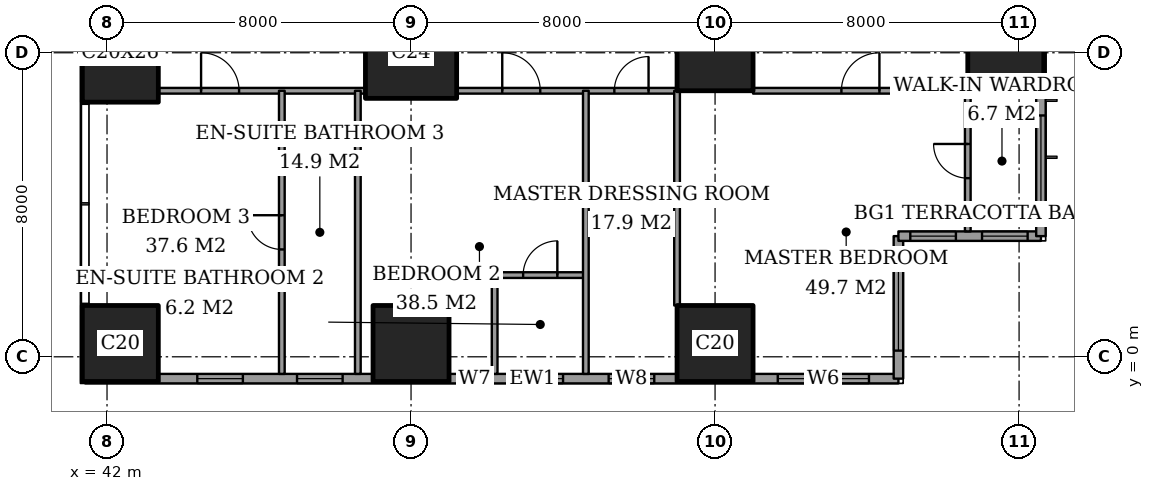
"""IFC4 building model, lengths in metres.
Left out: names, types, materials, properties, quantities, classifications, styles, units other than length and angle.
Written with IfcOpenShell. Run it as: python <this file> out.ifc"""

import sys

from ifc_helpers import new_model, si_unit, direction, frame, frame_2d, origin, origin_2d, place, context, subcontext, project, spatial, rectangle, extrude, element, fill, save


model = new_model("IFC4")
c1 = context("Model", 3, precision=1e-05, world=origin(), true_north=direction((0.0, 1.0)))
c2 = subcontext(c1, "Body", "Model", "MODEL_VIEW")
j1 = project(units=[si_unit("LENGTHUNIT", "METRE"), si_unit("PLANEANGLEUNIT", "RADIAN")], contexts=[c1])
p1 = place(None, origin())
s1 = spatial("IfcSite", under=j1, at=p1, CompositionType="ELEMENT")
p2 = place(p1, origin())
s2 = spatial("IfcBuilding", under=s1, at=p2, CompositionType="ELEMENT")
p3 = place(p2, frame((0.0, 0.0, 69.2)))
s3 = spatial("IfcBuildingStorey", under=s2, at=p3, CompositionType="ELEMENT", Elevation=69.2)
p4 = place(p3, frame((42.35, 0.35, 0.0), z_axis=(0.0, 0.0, 1.0), x_axis=(1.0, 0.0, 0.0)))
e1 = element("IfcColumn", 1, at=p4, inside=s3, PredefinedType="COLUMN", context=c2, shape_type="SweptSolid", body=[
    extrude(rectangle(XDim=2.0, YDim=2.0, at=origin_2d()), origin(), (0.0, 0.0, 1.0), 3.6),
])
p5 = place(p3, frame((42.35, 8.0, 0.0), z_axis=(0.0, 0.0, 1.0), x_axis=(1.0, 0.0, 0.0)))
e2 = element("IfcColumn", 2, at=p5, inside=s3, PredefinedType="COLUMN", context=c2, shape_type="SweptSolid", body=[
    extrude(rectangle(XDim=2.0, YDim=2.6, at=origin_2d()), origin(), (0.0, 0.0, 1.0), 3.6),
])
p6 = place(p3, frame((50.0, 0.35, 0.0), z_axis=(0.0, 0.0, 1.0), x_axis=(1.0, 0.0, 0.0)))
e3 = element("IfcColumn", 3, at=p6, inside=s3, PredefinedType="COLUMN", context=c2, shape_type="SweptSolid", body=[
    extrude(rectangle(XDim=2.0, YDim=2.0, at=origin_2d()), origin(), (0.0, 0.0, 1.0), 3.6),
])
p7 = place(p3, frame((50.0, 8.0, 0.0), z_axis=(0.0, 0.0, 1.0), x_axis=(1.0, 0.0, 0.0)))
e4 = element("IfcColumn", 4, at=p7, inside=s3, PredefinedType="COLUMN", context=c2, shape_type="SweptSolid", body=[
    extrude(rectangle(XDim=2.4, YDim=2.4, at=origin_2d()), origin(), (0.0, 0.0, 1.0), 3.6),
])
for number, where, z_axis, x_axis in (
    (5, (58.0, 0.35, 0.0), (0.0, 0.0, 1.0), (1.0, 0.0, 0.0)),
    (6, (58.0, 8.0, 0.0), (0.0, 0.0, 1.0), (1.0, 0.0, 0.0)),
    (7, (65.65, 8.0, 0.0), (0.0, 0.0, 1.0), (1.0, 0.0, 0.0)),
):
    element("IfcColumn", number, at=place(p3, frame(where, z_axis=z_axis, x_axis=x_axis)), inside=s3, PredefinedType="COLUMN", context=c2, shape_type="SweptSolid", body=[
        extrude(rectangle(XDim=2.0, YDim=2.0, at=origin_2d()), origin(), (0.0, 0.0, 1.0), 3.6),
    ])
p8 = place(p3, frame((41.425, -0.575, 0.0), z_axis=(0.0, 0.0, 1.0), x_axis=(1.0, 0.0, 0.0)))
e8 = element("IfcWall", 8, at=p8, inside=s3, PredefinedType="SOLIDWALL", context=c2, shape_type="SweptSolid", body=[
    extrude(rectangle(XDim=21.4, YDim=0.25, at=frame_2d((10.7, 0.0))), origin(), (0.0, 0.0, 1.0), 3.6),
])
p9 = place(p8, frame((2.95, 0.0, 0.6)))
e9 = element("IfcOpeningElement", 9, at=p9, cuts=e8, PredefinedType="OPENING", context=c2, shape_type="SweptSolid", body=[
    extrude(rectangle(XDim=1.2, YDim=2.0, at=frame_2d((0.6, 1.0))), frame((0.0, 0.135, 0.0), z_axis=(0.0, -1.0, 0.0), x_axis=(1.0, 0.0, 0.0)), (0.0, 0.0, 1.0), 0.27),
])
p10 = place(p8, frame((5.575, 0.0, 0.6)))
e10 = element("IfcOpeningElement", 10, at=p10, cuts=e8, PredefinedType="OPENING", context=c2, shape_type="SweptSolid", body=[
    extrude(rectangle(XDim=1.2, YDim=2.0, at=frame_2d((0.6, 1.0))), frame((0.0, 0.135, 0.0), z_axis=(0.0, -1.0, 0.0), x_axis=(1.0, 0.0, 0.0)), (0.0, 0.0, 1.0), 0.27),
])
p11 = place(p8, frame((9.95, 0.0, 0.6)))
e11 = element("IfcOpeningElement", 11, at=p11, cuts=e8, PredefinedType="OPENING", context=c2, shape_type="SweptSolid", body=[
    extrude(rectangle(XDim=0.6, YDim=2.0, at=frame_2d((0.3, 1.0))), frame((0.0, 0.135, 0.0), z_axis=(0.0, -1.0, 0.0), x_axis=(1.0, 0.0, 0.0)), (0.0, 0.0, 1.0), 0.27),
])
p12 = place(p8, frame((11.375, 0.0, 0.6)))
e12 = element("IfcOpeningElement", 12, at=p12, cuts=e8, PredefinedType="OPENING", context=c2, shape_type="SweptSolid", body=[
    extrude(rectangle(XDim=1.2, YDim=2.0, at=frame_2d((0.6, 1.0))), frame((0.0, 0.135, 0.0), z_axis=(0.0, -1.0, 0.0), x_axis=(1.0, 0.0, 0.0)), (0.0, 0.0, 1.0), 0.27),
])
p13 = place(p8, frame((13.775, 0.0, 0.6)))
e13 = element("IfcOpeningElement", 13, at=p13, cuts=e8, PredefinedType="OPENING", context=c2, shape_type="SweptSolid", body=[
    extrude(rectangle(XDim=1.2, YDim=2.0, at=frame_2d((0.6, 1.0))), frame((0.0, 0.135, 0.0), z_axis=(0.0, -1.0, 0.0), x_axis=(1.0, 0.0, 0.0)), (0.0, 0.0, 1.0), 0.27),
])
p14 = place(p8, frame((18.225, 0.0, 0.6)))
e14 = element("IfcOpeningElement", 14, at=p14, cuts=e8, PredefinedType="OPENING", context=c2, shape_type="SweptSolid", body=[
    extrude(rectangle(XDim=2.4, YDim=2.0, at=frame_2d((1.2, 1.0))), frame((0.0, 0.135, 0.0), z_axis=(0.0, -1.0, 0.0), x_axis=(1.0, 0.0, 0.0)), (0.0, 0.0, 1.0), 0.27),
])
p15 = place(p3, frame((62.825, -0.575, 0.0), z_axis=(0.0, 0.0, 1.0), x_axis=(0.0, 1.0, 0.0)))
e15 = element("IfcWall", 15, at=p15, inside=s3, PredefinedType="SOLIDWALL", context=c2, shape_type="SweptSolid", body=[
    extrude(rectangle(XDim=3.75, YDim=0.25, at=frame_2d((1.875, 0.0))), origin(), (0.0, 0.0, 1.0), 3.6),
])
p16 = place(p15, frame((0.738, 0.0, 0.6)))
e16 = element("IfcOpeningElement", 16, at=p16, cuts=e15, PredefinedType="OPENING", context=c2, shape_type="SweptSolid", body=[
    extrude(rectangle(XDim=2.4, YDim=2.0, at=frame_2d((1.2, 1.0))), frame((0.0, 0.135, 0.0), z_axis=(0.0, -1.0, 0.0), x_axis=(1.0, 0.0, 0.0)), (0.0, 0.0, 1.0), 0.27),
])
p17 = place(p3, frame((62.825, 3.175, 0.0), z_axis=(0.0, 0.0, 1.0), x_axis=(1.0, 0.0, 0.0)))
e17 = element("IfcWall", 17, at=p17, inside=s3, PredefinedType="SOLIDWALL", context=c2, shape_type="SweptSolid", body=[
    extrude(rectangle(XDim=3.75, YDim=0.25, at=frame_2d((1.875, 0.0))), origin(), (0.0, 0.0, 1.0), 3.6),
])
p18 = place(p17, frame((0.312, 0.0, 0.6)))
e18 = element("IfcOpeningElement", 18, at=p18, cuts=e17, PredefinedType="OPENING", context=c2, shape_type="SweptSolid", body=[
    extrude(rectangle(XDim=1.2, YDim=2.0, at=frame_2d((0.6, 1.0))), frame((0.0, 0.135, 0.0), z_axis=(0.0, -1.0, 0.0), x_axis=(1.0, 0.0, 0.0)), (0.0, 0.0, 1.0), 0.27),
])
p19 = place(p17, frame((2.2, 0.0, 0.6)))
e19 = element("IfcOpeningElement", 19, at=p19, cuts=e17, PredefinedType="OPENING", context=c2, shape_type="SweptSolid", body=[
    extrude(rectangle(XDim=1.2, YDim=2.0, at=frame_2d((0.6, 1.0))), frame((0.0, 0.135, 0.0), z_axis=(0.0, -1.0, 0.0), x_axis=(1.0, 0.0, 0.0)), (0.0, 0.0, 1.0), 0.27),
])
p20 = place(p3, frame((66.575, 3.175, 0.0), z_axis=(0.0, 0.0, 1.0), x_axis=(0.0, 1.0, 0.0)))
e20 = element("IfcWall", 20, at=p20, inside=s3, PredefinedType="SOLIDWALL", context=c2, shape_type="SweptSolid", body=[
    extrude(rectangle(XDim=41.65, YDim=0.25, at=frame_2d((20.825, 0.0))), origin(), (0.0, 0.0, 1.0), 3.6),
])
p21 = place(p20, frame((0.775, 0.0, 0.6)))
e21 = element("IfcOpeningElement", 21, at=p21, cuts=e20, PredefinedType="OPENING", context=c2, shape_type="SweptSolid", body=[
    extrude(rectangle(XDim=2.4, YDim=2.0, at=frame_2d((1.2, 1.0))), frame((0.0, 0.135, 0.0), z_axis=(0.0, -1.0, 0.0), x_axis=(1.0, 0.0, 0.0)), (0.0, 0.0, 1.0), 0.27),
])
p22 = place(p20, frame((6.1, 0.0, 0.6)))
e22 = element("IfcOpeningElement", 22, at=p22, cuts=e20, PredefinedType="OPENING", context=c2, shape_type="SweptSolid", body=[
    extrude(rectangle(XDim=1.2, YDim=2.0, at=frame_2d((0.6, 1.0))), frame((0.0, 0.135, 0.0), z_axis=(0.0, -1.0, 0.0), x_axis=(1.0, 0.0, 0.0)), (0.0, 0.0, 1.0), 0.27),
])
p23 = place(p20, frame((8.275, 0.0, 0.6)))
e23 = element("IfcOpeningElement", 23, at=p23, cuts=e20, PredefinedType="OPENING", context=c2, shape_type="SweptSolid", body=[
    extrude(rectangle(XDim=2.4, YDim=2.0, at=frame_2d((1.2, 1.0))), frame((0.0, 0.135, 0.0), z_axis=(0.0, -1.0, 0.0), x_axis=(1.0, 0.0, 0.0)), (0.0, 0.0, 1.0), 0.27),
])
p24 = place(p20, frame((15.775, 0.0, 0.6)))
e24 = element("IfcOpeningElement", 24, at=p24, cuts=e20, PredefinedType="OPENING", context=c2, shape_type="SweptSolid", body=[
    extrude(rectangle(XDim=2.4, YDim=2.0, at=frame_2d((1.2, 1.0))), frame((0.0, 0.135, 0.0), z_axis=(0.0, -1.0, 0.0), x_axis=(1.0, 0.0, 0.0)), (0.0, 0.0, 1.0), 0.27),
])
p25 = place(p20, frame((23.475, 0.0, 0.6)))
e25 = element("IfcOpeningElement", 25, at=p25, cuts=e20, PredefinedType="OPENING", context=c2, shape_type="SweptSolid", body=[
    extrude(rectangle(XDim=2.4, YDim=2.0, at=frame_2d((1.2, 1.0))), frame((0.0, 0.135, 0.0), z_axis=(0.0, -1.0, 0.0), x_axis=(1.0, 0.0, 0.0)), (0.0, 0.0, 1.0), 0.27),
])
p26 = place(p20, frame((30.975, 0.0, 0.6)))
e26 = element("IfcOpeningElement", 26, at=p26, cuts=e20, PredefinedType="OPENING", context=c2, shape_type="SweptSolid", body=[
    extrude(rectangle(XDim=2.4, YDim=2.0, at=frame_2d((1.2, 1.0))), frame((0.0, 0.135, 0.0), z_axis=(0.0, -1.0, 0.0), x_axis=(1.0, 0.0, 0.0)), (0.0, 0.0, 1.0), 0.27),
])
p27 = place(p20, frame((34.5, 0.0, 0.6)))
e27 = element("IfcOpeningElement", 27, at=p27, cuts=e20, PredefinedType="OPENING", context=c2, shape_type="SweptSolid", body=[
    extrude(rectangle(XDim=1.2, YDim=2.0, at=frame_2d((0.6, 1.0))), frame((0.0, 0.135, 0.0), z_axis=(0.0, -1.0, 0.0), x_axis=(1.0, 0.0, 0.0)), (0.0, 0.0, 1.0), 0.27),
])
p28 = place(p20, frame((38.475, 0.0, 0.6)))
e28 = element("IfcOpeningElement", 28, at=p28, cuts=e20, PredefinedType="OPENING", context=c2, shape_type="SweptSolid", body=[
    extrude(rectangle(XDim=2.4, YDim=2.0, at=frame_2d((1.2, 1.0))), frame((0.0, 0.135, 0.0), z_axis=(0.0, -1.0, 0.0), x_axis=(1.0, 0.0, 0.0)), (0.0, 0.0, 1.0), 0.27),
])
p29 = place(p3, frame((52.2, 2.15, 0.0), z_axis=(0.0, 0.0, 1.0), x_axis=(1.0, 0.0, 0.0)))
e29 = element("IfcWall", 29, at=p29, inside=s3, PredefinedType="PARTITIONING", context=c2, shape_type="SweptSolid", body=[
    extrude(rectangle(XDim=2.4, YDim=0.15, at=frame_2d((1.2, 0.0))), origin(), (0.0, 0.0, 1.0), 3.35),
])
p30 = place(p29, frame((0.75, 0.0, 0.0)))
e30 = element("IfcOpeningElement", 30, at=p30, cuts=e29, PredefinedType="OPENING", context=c2, shape_type="SweptSolid", body=[
    extrude(rectangle(XDim=0.9, YDim=2.1, at=frame_2d((0.45, 1.05))), frame((0.0, 0.085, 0.0), z_axis=(0.0, -1.0, 0.0), x_axis=(1.0, 0.0, 0.0)), (0.0, 0.0, 1.0), 0.17),
])
p31 = place(p3, frame((43.35, 7.0, 0.0), z_axis=(0.0, 0.0, 1.0), x_axis=(1.0, 0.0, 0.0)))
e31 = element("IfcWall", 31, at=p31, inside=s3, PredefinedType="PARTITIONING", context=c2, shape_type="SweptSolid", body=[
    extrude(rectangle(XDim=5.45, YDim=0.15, at=frame_2d((2.725, 0.0))), origin(), (0.0, 0.0, 1.0), 3.35),
])
p32 = place(p31, frame((1.125, 0.0, 0.0)))
e32 = element("IfcOpeningElement", 32, at=p32, cuts=e31, PredefinedType="OPENING", context=c2, shape_type="SweptSolid", body=[
    extrude(rectangle(XDim=1.0, YDim=2.1, at=frame_2d((0.5, 1.05))), frame((0.0, 0.085, 0.0), z_axis=(0.0, -1.0, 0.0), x_axis=(1.0, 0.0, 0.0)), (0.0, 0.0, 1.0), 0.17),
])
p33 = place(p3, frame((51.2, 7.0, 0.0), z_axis=(0.0, 0.0, 1.0), x_axis=(1.0, 0.0, 0.0)))
e33 = element("IfcWall", 33, at=p33, inside=s3, PredefinedType="PARTITIONING", context=c2, shape_type="SweptSolid", body=[
    extrude(rectangle(XDim=5.8, YDim=0.15, at=frame_2d((2.9, 0.0))), origin(), (0.0, 0.0, 1.0), 3.35),
])
p34 = place(p33, frame((4.15, 0.0, 0.0)))
e34 = element("IfcOpeningElement", 34, at=p34, cuts=e33, PredefinedType="OPENING", context=c2, shape_type="SweptSolid", body=[
    extrude(rectangle(XDim=0.9, YDim=2.1, at=frame_2d((0.45, 1.05))), frame((0.0, 0.085, 0.0), z_axis=(0.0, -1.0, 0.0), x_axis=(1.0, 0.0, 0.0)), (0.0, 0.0, 1.0), 0.17),
])
p35 = place(p33, frame((1.2, 0.0, 0.0)))
e35 = element("IfcOpeningElement", 35, at=p35, cuts=e33, PredefinedType="OPENING", context=c2, shape_type="SweptSolid", body=[
    extrude(rectangle(XDim=1.0, YDim=2.1, at=frame_2d((0.5, 1.05))), frame((0.0, 0.085, 0.0), z_axis=(0.0, -1.0, 0.0), x_axis=(1.0, 0.0, 0.0)), (0.0, 0.0, 1.0), 0.17),
])
p36 = place(p3, frame((59.0, 7.0, 0.0), z_axis=(0.0, 0.0, 1.0), x_axis=(1.0, 0.0, 0.0)))
e36 = element("IfcWall", 36, at=p36, inside=s3, PredefinedType="PARTITIONING", context=c2, shape_type="SweptSolid", body=[
    extrude(rectangle(XDim=5.65, YDim=0.15, at=frame_2d((2.825, 0.0))), origin(), (0.0, 0.0, 1.0), 3.35),
])
p37 = place(p36, frame((2.325, 0.0, 0.0)))
e37 = element("IfcOpeningElement", 37, at=p37, cuts=e36, PredefinedType="OPENING", context=c2, shape_type="SweptSolid", body=[
    extrude(rectangle(XDim=1.0, YDim=2.1, at=frame_2d((0.5, 1.05))), frame((0.0, 0.085, 0.0), z_axis=(0.0, -1.0, 0.0), x_axis=(1.0, 0.0, 0.0)), (0.0, 0.0, 1.0), 0.17),
])
p38 = place(p3, frame((46.6, -0.45, 0.0), z_axis=(0.0, 0.0, 1.0), x_axis=(0.0, 1.0, 0.0)))
e38 = element("IfcWall", 38, at=p38, inside=s3, PredefinedType="PARTITIONING", context=c2, shape_type="SweptSolid", body=[
    extrude(rectangle(XDim=7.45, YDim=0.15, at=frame_2d((3.725, 0.0))), origin(), (0.0, 0.0, 1.0), 3.35),
])
p39 = place(p38, frame((3.275, 0.0, 0.0)))
e39 = element("IfcOpeningElement", 39, at=p39, cuts=e38, PredefinedType="OPENING", context=c2, shape_type="SweptSolid", body=[
    extrude(rectangle(XDim=0.9, YDim=2.1, at=frame_2d((0.45, 1.05))), frame((0.0, 0.085, 0.0), z_axis=(0.0, -1.0, 0.0), x_axis=(1.0, 0.0, 0.0)), (0.0, 0.0, 1.0), 0.17),
])
p40 = place(p3, frame((48.6, -0.45, 0.0), z_axis=(0.0, 0.0, 1.0), x_axis=(0.0, 1.0, 0.0)))
e40 = element("IfcWall", 40, at=p40, inside=s3, PredefinedType="PARTITIONING", context=c2, shape_type="SweptSolid", body=[
    extrude(rectangle(XDim=7.45, YDim=0.15, at=frame_2d((3.725, 0.0))), origin(), (0.0, 0.0, 1.0), 3.35),
])
p41 = place(p3, frame((52.2, -0.45, 0.0), z_axis=(0.0, 0.0, 1.0), x_axis=(0.0, 1.0, 0.0)))
e41 = element("IfcWall", 41, at=p41, inside=s3, PredefinedType="PARTITIONING", context=c2, shape_type="SweptSolid", body=[
    extrude(rectangle(XDim=2.6, YDim=0.15, at=frame_2d((1.3, 0.0))), origin(), (0.0, 0.0, 1.0), 3.35),
])
p42 = place(p3, frame((54.6, -0.45, 0.0), z_axis=(0.0, 0.0, 1.0), x_axis=(0.0, 1.0, 0.0)))
e42 = element("IfcWall", 42, at=p42, inside=s3, PredefinedType="PARTITIONING", context=c2, shape_type="SweptSolid", body=[
    extrude(rectangle(XDim=7.45, YDim=0.15, at=frame_2d((3.725, 0.0))), origin(), (0.0, 0.0, 1.0), 3.35),
])
p43 = place(p3, frame((57.0, 1.35, 0.0), z_axis=(0.0, 0.0, 1.0), x_axis=(0.0, 1.0, 0.0)))
e43 = element("IfcWall", 43, at=p43, inside=s3, PredefinedType="PARTITIONING", context=c2, shape_type="SweptSolid", body=[
    extrude(rectangle(XDim=5.65, YDim=0.15, at=frame_2d((2.825, 0.0))), origin(), (0.0, 0.0, 1.0), 3.35),
])
p44 = place(p3, frame((64.65, 3.3, 0.0), z_axis=(0.0, 0.0, 1.0), x_axis=(0.0, 1.0, 0.0)))
e44 = element("IfcWall", 44, at=p44, inside=s3, PredefinedType="PARTITIONING", context=c2, shape_type="SweptSolid", body=[
    extrude(rectangle(XDim=3.7, YDim=0.15, at=frame_2d((1.85, 0.0))), origin(), (0.0, 0.0, 1.0), 3.35),
])
p45 = place(p44, frame((1.4, 0.0, 0.0)))
e45 = element("IfcOpeningElement", 45, at=p45, cuts=e44, PredefinedType="OPENING", context=c2, shape_type="SweptSolid", body=[
    extrude(rectangle(XDim=0.9, YDim=2.1, at=frame_2d((0.45, 1.05))), frame((0.0, 0.085, 0.0), z_axis=(0.0, -1.0, 0.0), x_axis=(1.0, 0.0, 0.0)), (0.0, 0.0, 1.0), 0.17),
])
p46 = place(p9, origin())
e46 = element("IfcWindow", 46, at=p46, inside=s3, PartitioningType="SINGLE_PANEL", PredefinedType="WINDOW", context=c2, shape_type="SweptSolid", body=[
    extrude(rectangle(XDim=1.2, YDim=2.0, at=frame_2d((0.6, 1.0))), frame((0.0, 0.03, 0.0), z_axis=(0.0, -1.0, 0.0), x_axis=(1.0, 0.0, 0.0)), (0.0, 0.0, 1.0), 0.06),
])
fill(e9, e46)
p47 = place(p10, origin())
e47 = element("IfcWindow", 47, at=p47, inside=s3, PartitioningType="SINGLE_PANEL", PredefinedType="WINDOW", context=c2, shape_type="SweptSolid", body=[
    extrude(rectangle(XDim=1.2, YDim=2.0, at=frame_2d((0.6, 1.0))), frame((0.0, 0.03, 0.0), z_axis=(0.0, -1.0, 0.0), x_axis=(1.0, 0.0, 0.0)), (0.0, 0.0, 1.0), 0.06),
])
fill(e10, e47)
p48 = place(p11, origin())
e48 = element("IfcWindow", 48, at=p48, inside=s3, PartitioningType="SINGLE_PANEL", PredefinedType="WINDOW", context=c2, shape_type="SweptSolid", body=[
    extrude(rectangle(XDim=0.6, YDim=2.0, at=frame_2d((0.3, 1.0))), frame((0.0, 0.03, 0.0), z_axis=(0.0, -1.0, 0.0), x_axis=(1.0, 0.0, 0.0)), (0.0, 0.0, 1.0), 0.06),
])
fill(e11, e48)
p49 = place(p12, origin())
e49 = element("IfcWindow", 49, at=p49, inside=s3, PartitioningType="SINGLE_PANEL", PredefinedType="WINDOW", context=c2, shape_type="SweptSolid", body=[
    extrude(rectangle(XDim=1.2, YDim=2.0, at=frame_2d((0.6, 1.0))), frame((0.0, 0.03, 0.0), z_axis=(0.0, -1.0, 0.0), x_axis=(1.0, 0.0, 0.0)), (0.0, 0.0, 1.0), 0.06),
])
fill(e12, e49)
p50 = place(p13, origin())
e50 = element("IfcWindow", 50, at=p50, inside=s3, PartitioningType="SINGLE_PANEL", PredefinedType="WINDOW", context=c2, shape_type="SweptSolid", body=[
    extrude(rectangle(XDim=1.2, YDim=2.0, at=frame_2d((0.6, 1.0))), frame((0.0, 0.03, 0.0), z_axis=(0.0, -1.0, 0.0), x_axis=(1.0, 0.0, 0.0)), (0.0, 0.0, 1.0), 0.06),
])
fill(e13, e50)
p51 = place(p14, origin())
e51 = element("IfcWindow", 51, at=p51, inside=s3, PartitioningType="SINGLE_PANEL", PredefinedType="WINDOW", context=c2, shape_type="SweptSolid", body=[
    extrude(rectangle(XDim=2.4, YDim=2.0, at=frame_2d((1.2, 1.0))), frame((0.0, 0.03, 0.0), z_axis=(0.0, -1.0, 0.0), x_axis=(1.0, 0.0, 0.0)), (0.0, 0.0, 1.0), 0.06),
])
fill(e14, e51)
p52 = place(p16, origin())
e52 = element("IfcWindow", 52, at=p52, inside=s3, PartitioningType="SINGLE_PANEL", PredefinedType="WINDOW", context=c2, shape_type="SweptSolid", body=[
    extrude(rectangle(XDim=2.4, YDim=2.0, at=frame_2d((1.2, 1.0))), frame((0.0, 0.03, 0.0), z_axis=(0.0, -1.0, 0.0), x_axis=(1.0, 0.0, 0.0)), (0.0, 0.0, 1.0), 0.06),
])
fill(e16, e52)
p53 = place(p18, origin())
e53 = element("IfcWindow", 53, at=p53, inside=s3, PartitioningType="SINGLE_PANEL", PredefinedType="WINDOW", context=c2, shape_type="SweptSolid", body=[
    extrude(rectangle(XDim=1.2, YDim=2.0, at=frame_2d((0.6, 1.0))), frame((0.0, 0.03, 0.0), z_axis=(0.0, -1.0, 0.0), x_axis=(1.0, 0.0, 0.0)), (0.0, 0.0, 1.0), 0.06),
])
fill(e18, e53)
p54 = place(p19, origin())
e54 = element("IfcWindow", 54, at=p54, inside=s3, PartitioningType="SINGLE_PANEL", PredefinedType="WINDOW", context=c2, shape_type="SweptSolid", body=[
    extrude(rectangle(XDim=1.2, YDim=2.0, at=frame_2d((0.6, 1.0))), frame((0.0, 0.03, 0.0), z_axis=(0.0, -1.0, 0.0), x_axis=(1.0, 0.0, 0.0)), (0.0, 0.0, 1.0), 0.06),
])
fill(e19, e54)
p55 = place(p21, origin())
e55 = element("IfcWindow", 55, at=p55, inside=s3, PartitioningType="SINGLE_PANEL", PredefinedType="WINDOW", context=c2, shape_type="SweptSolid", body=[
    extrude(rectangle(XDim=2.4, YDim=2.0, at=frame_2d((1.2, 1.0))), frame((0.0, 0.03, 0.0), z_axis=(0.0, -1.0, 0.0), x_axis=(1.0, 0.0, 0.0)), (0.0, 0.0, 1.0), 0.06),
])
fill(e21, e55)
p56 = place(p45, origin())
e56 = element("IfcDoor", 56, at=p56, inside=s3, OperationType="SINGLE_SWING_LEFT", PredefinedType="DOOR", context=c2, shape_type="SweptSolid", body=[
    extrude(rectangle(XDim=0.9, YDim=2.1, at=frame_2d((0.45, 1.05))), frame((0.0, 0.025, 0.0), z_axis=(0.0, -1.0, 0.0), x_axis=(1.0, 0.0, 0.0)), (0.0, 0.0, 1.0), 0.05),
])
fill(e45, e56)
p57 = place(p37, origin())
e57 = element("IfcDoor", 57, at=p57, inside=s3, OperationType="SINGLE_SWING_LEFT", PredefinedType="DOOR", context=c2, shape_type="SweptSolid", body=[
    extrude(rectangle(XDim=1.0, YDim=2.1, at=frame_2d((0.5, 1.05))), frame((0.0, 0.025, 0.0), z_axis=(0.0, -1.0, 0.0), x_axis=(1.0, 0.0, 0.0)), (0.0, 0.0, 1.0), 0.05),
])
fill(e37, e57)
p58 = place(p34, origin())
e58 = element("IfcDoor", 58, at=p58, inside=s3, OperationType="SINGLE_SWING_LEFT", PredefinedType="DOOR", context=c2, shape_type="SweptSolid", body=[
    extrude(rectangle(XDim=0.9, YDim=2.1, at=frame_2d((0.45, 1.05))), frame((0.0, 0.025, 0.0), z_axis=(0.0, -1.0, 0.0), x_axis=(1.0, 0.0, 0.0)), (0.0, 0.0, 1.0), 0.05),
])
fill(e34, e58)
p59 = place(p30, origin())
e59 = element("IfcDoor", 59, at=p59, inside=s3, OperationType="SINGLE_SWING_LEFT", PredefinedType="DOOR", context=c2, shape_type="SweptSolid", body=[
    extrude(rectangle(XDim=0.9, YDim=2.1, at=frame_2d((0.45, 1.05))), frame((0.0, 0.025, 0.0), z_axis=(0.0, -1.0, 0.0), x_axis=(1.0, 0.0, 0.0)), (0.0, 0.0, 1.0), 0.05),
])
fill(e30, e59)
p60 = place(p35, origin())
e60 = element("IfcDoor", 60, at=p60, inside=s3, OperationType="SINGLE_SWING_RIGHT", PredefinedType="DOOR", context=c2, shape_type="SweptSolid", body=[
    extrude(rectangle(XDim=1.0, YDim=2.1, at=frame_2d((0.5, 1.05))), frame((0.0, 0.025, 0.0), z_axis=(0.0, -1.0, 0.0), x_axis=(1.0, 0.0, 0.0)), (0.0, 0.0, 1.0), 0.05),
])
fill(e35, e60)
p61 = place(p39, origin())
e61 = element("IfcDoor", 61, at=p61, inside=s3, OperationType="SINGLE_SWING_LEFT", PredefinedType="DOOR", context=c2, shape_type="SweptSolid", body=[
    extrude(rectangle(XDim=0.9, YDim=2.1, at=frame_2d((0.45, 1.05))), frame((0.0, 0.025, 0.0), z_axis=(0.0, -1.0, 0.0), x_axis=(1.0, 0.0, 0.0)), (0.0, 0.0, 1.0), 0.05),
])
fill(e39, e61)
p62 = place(p32, origin())
e62 = element("IfcDoor", 62, at=p62, inside=s3, OperationType="SINGLE_SWING_RIGHT", PredefinedType="DOOR", context=c2, shape_type="SweptSolid", body=[
    extrude(rectangle(XDim=1.0, YDim=2.1, at=frame_2d((0.5, 1.05))), frame((0.0, 0.025, 0.0), z_axis=(0.0, -1.0, 0.0), x_axis=(1.0, 0.0, 0.0)), (0.0, 0.0, 1.0), 0.05),
])
fill(e32, e62)
save(model, sys.argv[1])
